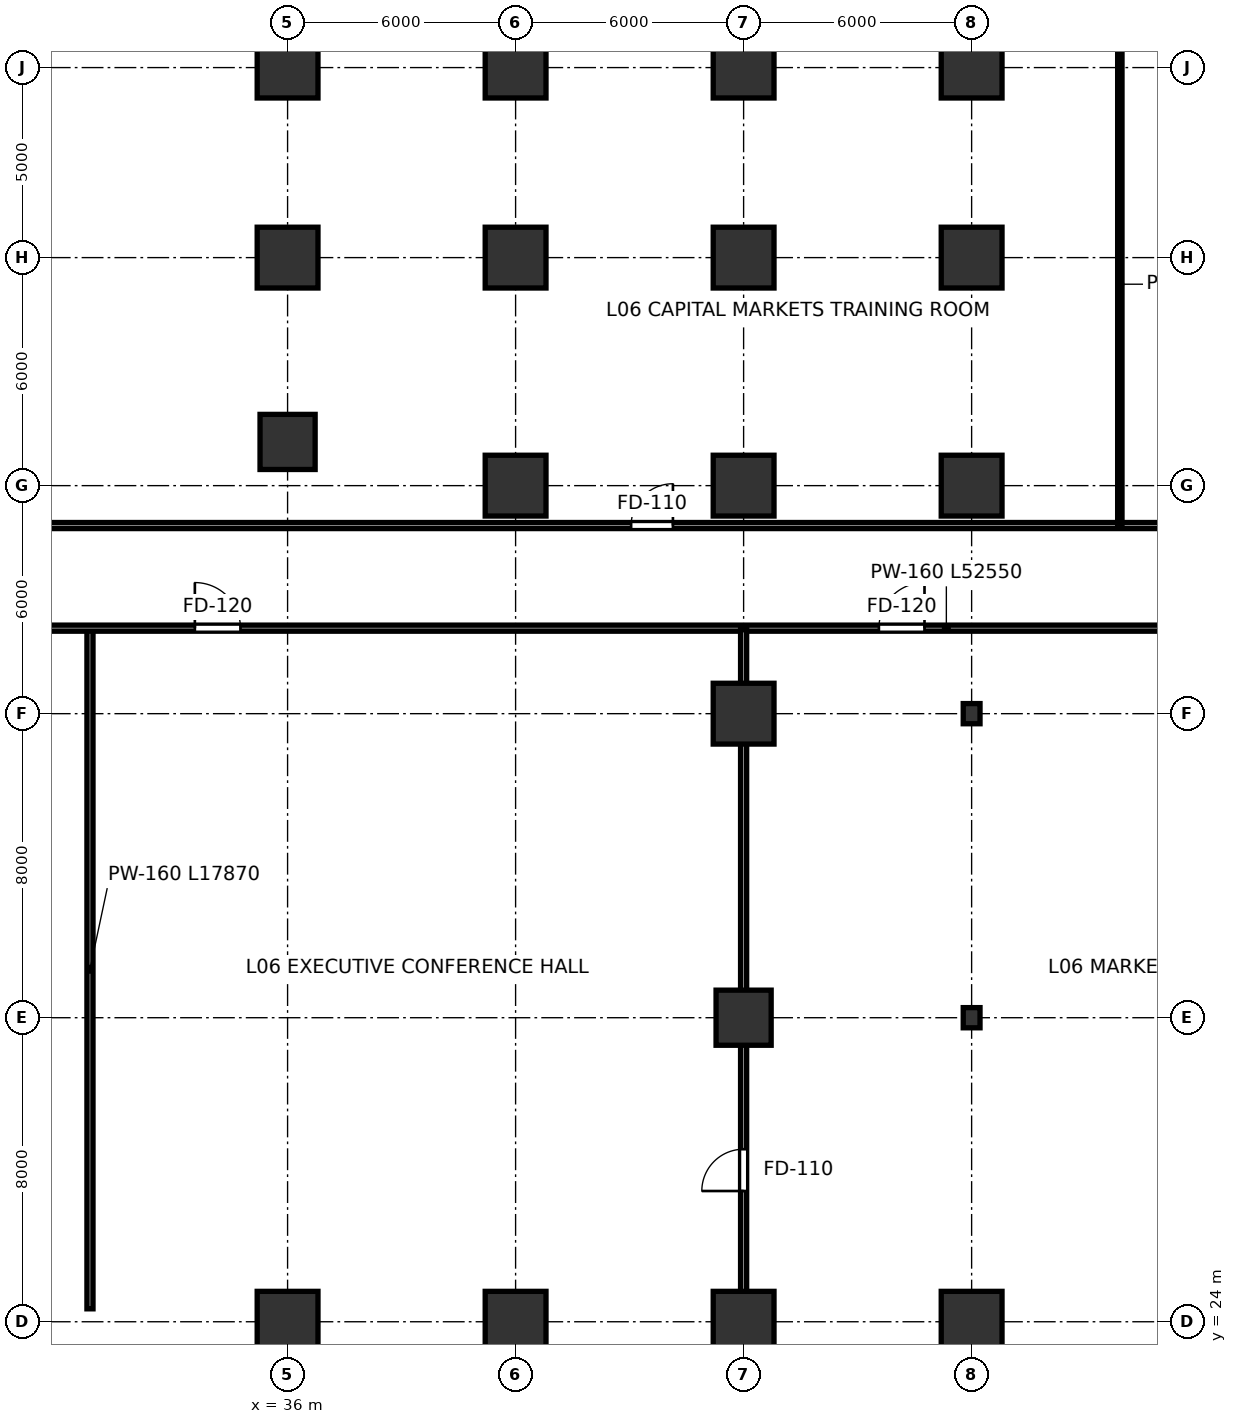
"""IFC4 building model, lengths in metres.
Left out: names, types, materials, properties, quantities, classifications, styles, units other than length and angle.
Written with IfcOpenShell. Run it as: python <this file> out.ifc"""

import sys

from ifc_helpers import new_model, si_unit, direction, frame, frame_2d, origin, origin_2d, place, context, subcontext, project, spatial, rectangle, i_section, extrude, clip, halfspace, source, transform, mapped, element, fill, save


model = new_model("IFC4")
c1 = context("Model", 3, precision=1e-05, world=origin(), true_north=direction((0.0, 1.0)))
c2 = subcontext(c1, "Body", "Model", "MODEL_VIEW")
j1 = project(units=[si_unit("LENGTHUNIT", "METRE"), si_unit("PLANEANGLEUNIT", "RADIAN")], contexts=[c1])
p1 = place(None, origin())
s1 = spatial("IfcSite", under=j1, at=p1, CompositionType="ELEMENT")
p2 = place(p1, origin())
s2 = spatial("IfcBuilding", under=s1, at=p2, CompositionType="ELEMENT")
p3 = place(p2, frame((0.0, 0.0, 28.0)))
s3 = spatial("IfcBuildingStorey", under=s2, at=p3, CompositionType="ELEMENT", Elevation=28.0)
p4 = place(p3, frame((36.0, 24.0, 0.0), z_axis=(-0.074738817011, -0.128755970086, 0.988855909321), x_axis=(0.864855191365, -0.502021411863, 0.0)))
e1 = element("IfcColumn", 1, at=p4, inside=s3, PredefinedType="COLUMN", context=c2, shape_type="Clipping", body=[
    clip(clip(extrude(rectangle(XDim=1.6, YDim=1.6, at=origin_2d()), origin(), (0.0, 0.0, 1.0), 4.854), halfspace(frame((0.0, 0.0, 0.121), z_axis=(0.0, 0.0, -1.0), x_axis=(1.0, 0.0, 0.0)), False)), halfspace(frame((0.0, 0.0, 4.733), z_axis=(0.0, 0.0, 1.0), x_axis=(1.0, 0.0, 0.0)), False)),
])
m1 = source(origin(), c2, "Body", "SweptSolid", [
    extrude(rectangle(XDim=1.6, YDim=1.6, at=origin_2d()), origin(), (0.0, 0.0, 1.0), 4.599),
])
p5 = place(p3, frame((36.0, 52.0, 0.001), z_axis=(0.0, 0.0, 1.0), x_axis=(1.0, 0.0, 0.0)))
e2 = element("IfcColumn", 2, at=p5, inside=s3, PredefinedType="COLUMN", context=c2, shape_type="MappedRepresentation", body=[
    mapped(m1, transform((0.0, 0.0, 0.0), scale=1.0)),
])
m2 = source(origin(), c2, "Body", "SweptSolid", [
    extrude(rectangle(XDim=1.6, YDim=1.6, at=origin_2d()), origin(), (0.0, 0.0, 1.0), 4.599),
])
p6 = place(p3, frame((36.0, 57.0, 0.001), z_axis=(0.0, 0.0, 1.0), x_axis=(1.0, 0.0, 0.0)))
e3 = element("IfcColumn", 3, at=p6, inside=s3, PredefinedType="COLUMN", context=c2, shape_type="MappedRepresentation", body=[
    mapped(m2, transform((0.0, 0.0, 0.0), scale=1.0)),
])
p7 = place(p3, frame((36.0, 47.15, 0.0), z_axis=(0.132401625397, -0.13235166252, 0.982320134692), x_axis=(0.706973327046, 0.707240210144, 0.0)))
e4 = element("IfcColumn", 4, at=p7, inside=s3, PredefinedType="COLUMN", context=c2, shape_type="Clipping", body=[
    clip(clip(extrude(rectangle(XDim=1.45, YDim=1.45, at=origin_2d()), origin(), (0.0, 0.0, 1.0), 4.886), halfspace(frame((0.0, 0.0, 0.139), z_axis=(0.0, 0.0, -1.0), x_axis=(1.0, 0.0, 0.0)), False)), halfspace(frame((0.0, 0.0, 4.748), z_axis=(0.0, 0.0, 1.0), x_axis=(1.0, 0.0, 0.0)), False)),
])
p8 = place(p3, frame((42.0, 24.0, 0.0), z_axis=(-0.075259886608, -0.181142417601, 0.980572982502), x_axis=(0.923467612917, -0.383676384331, 0.0)))
e5 = element("IfcColumn", 5, at=p8, inside=s3, PredefinedType="COLUMN", context=c2, shape_type="Clipping", body=[
    clip(clip(extrude(rectangle(XDim=1.6, YDim=1.6, at=origin_2d()), origin(), (0.0, 0.0, 1.0), 4.895), halfspace(frame((0.0, 0.0, 0.161), z_axis=(0.0, 0.0, -1.0), x_axis=(1.0, 0.0, 0.0)), False)), halfspace(frame((0.0, 0.0, 4.734), z_axis=(0.0, 0.0, 1.0), x_axis=(1.0, 0.0, 0.0)), False)),
])
p9 = place(p3, frame((42.0, 46.0, 0.0), z_axis=(0.120166759651, -0.184417772759, 0.97547426156), x_axis=(0.83783025408, 0.545930824692, 0.0)))
e6 = element("IfcColumn", 6, at=p9, inside=s3, PredefinedType="COLUMN", context=c2, shape_type="Clipping", body=[
    clip(clip(extrude(rectangle(XDim=1.6, YDim=1.6, at=origin_2d()), origin(), (0.0, 0.0, 1.0), 4.921), halfspace(frame((0.0, 0.0, 0.181), z_axis=(0.0, 0.0, -1.0), x_axis=(1.0, 0.0, 0.0)), False)), halfspace(frame((0.0, 0.0, 4.74), z_axis=(0.0, 0.0, 1.0), x_axis=(1.0, 0.0, 0.0)), False)),
])
p10 = place(p3, frame((42.0, 52.0, 0.001), z_axis=(0.0, 0.0, 1.0), x_axis=(1.0, 0.0, 0.0)))
e7 = element("IfcColumn", 7, at=p10, inside=s3, PredefinedType="COLUMN", context=c2, shape_type="MappedRepresentation", body=[
    mapped(m1, transform((0.0, 0.0, 0.0), scale=1.0)),
])
p11 = place(p3, frame((42.0, 57.0, 0.001), z_axis=(0.0, 0.0, 1.0), x_axis=(1.0, 0.0, 0.0)))
e8 = element("IfcColumn", 8, at=p11, inside=s3, PredefinedType="COLUMN", context=c2, shape_type="MappedRepresentation", body=[
    mapped(m2, transform((0.0, 0.0, 0.0), scale=1.0)),
])
p12 = place(p3, frame((48.0, 24.0, 0.0), z_axis=(-0.07561517764, -0.231975329706, 0.969778217593), x_axis=(0.950764807949, -0.309913342672, 0.0)))
e9 = element("IfcColumn", 9, at=p12, inside=s3, PredefinedType="COLUMN", context=c2, shape_type="Clipping", body=[
    clip(clip(extrude(rectangle(XDim=1.6, YDim=1.6, at=origin_2d()), origin(), (0.0, 0.0, 1.0), 4.95), halfspace(frame((0.0, 0.0, 0.202), z_axis=(0.0, 0.0, -1.0), x_axis=(1.0, 0.0, 0.0)), False)), halfspace(frame((0.0, 0.0, 4.748), z_axis=(0.0, 0.0, 1.0), x_axis=(1.0, 0.0, 0.0)), False)),
])
p13 = place(p3, frame((48.0, 32.0, 0.0), z_axis=(-0.005093110912, -0.234134758899, 0.972190811979), x_axis=(0.999763489518, -0.021747759117, 0.0)))
e10 = element("IfcColumn", 10, at=p13, inside=s3, PredefinedType="COLUMN", context=c2, shape_type="Clipping", body=[
    clip(clip(extrude(rectangle(XDim=1.45, YDim=1.45, at=origin_2d()), origin(), (0.0, 0.0, 1.0), 4.937), halfspace(frame((0.0, 0.0, 0.175), z_axis=(0.0, 0.0, -1.0), x_axis=(1.0, 0.0, 0.0)), False)), halfspace(frame((0.0, 0.0, 4.762), z_axis=(0.0, 0.0, 1.0), x_axis=(1.0, 0.0, 0.0)), False)),
])
p14 = place(p3, frame((48.0, 40.0, 0.0), z_axis=(0.065404532384, -0.235081448976, 0.969772632884), x_axis=(0.963407779641, 0.268040015905, 0.0)))
e11 = element("IfcColumn", 11, at=p14, inside=s3, PredefinedType="COLUMN", context=c2, shape_type="Clipping", body=[
    clip(clip(extrude(rectangle(XDim=1.6, YDim=1.6, at=origin_2d()), origin(), (0.0, 0.0, 1.0), 4.95), halfspace(frame((0.0, 0.0, 0.202), z_axis=(0.0, 0.0, -1.0), x_axis=(1.0, 0.0, 0.0)), False)), halfspace(frame((0.0, 0.0, 4.748), z_axis=(0.0, 0.0, 1.0), x_axis=(1.0, 0.0, 0.0)), False)),
])
p15 = place(p3, frame((48.0, 46.0, 0.0), z_axis=(0.117679189372, -0.235014861511, 0.964841760735), x_axis=(0.894165640865, 0.447736313801, 0.0)))
e12 = element("IfcColumn", 12, at=p15, inside=s3, PredefinedType="COLUMN", context=c2, shape_type="Clipping", body=[
    clip(clip(extrude(rectangle(XDim=1.6, YDim=1.6, at=origin_2d()), origin(), (0.0, 0.0, 1.0), 4.975), halfspace(frame((0.0, 0.0, 0.219), z_axis=(0.0, 0.0, -1.0), x_axis=(1.0, 0.0, 0.0)), False)), halfspace(frame((0.0, 0.0, 4.756), z_axis=(0.0, 0.0, 1.0), x_axis=(1.0, 0.0, 0.0)), False)),
])
p16 = place(p3, frame((48.0, 52.0, 0.001), z_axis=(0.0, 0.0, 1.0), x_axis=(1.0, 0.0, 0.0)))
e13 = element("IfcColumn", 13, at=p16, inside=s3, PredefinedType="COLUMN", context=c2, shape_type="MappedRepresentation", body=[
    mapped(m1, transform((0.0, 0.0, 0.0), scale=1.0)),
])
p17 = place(p3, frame((48.0, 57.0, 0.001), z_axis=(0.0, 0.0, 1.0), x_axis=(1.0, 0.0, 0.0)))
e14 = element("IfcColumn", 14, at=p17, inside=s3, PredefinedType="COLUMN", context=c2, shape_type="MappedRepresentation", body=[
    mapped(m2, transform((0.0, 0.0, 0.0), scale=1.0)),
])
p18 = place(p3, frame((54.0, 24.0, 0.0), z_axis=(-0.075715593765, -0.28101385218, 0.956712268001), x_axis=(0.965565696682, -0.260159346154, 0.0)))
e15 = element("IfcColumn", 15, at=p18, inside=s3, PredefinedType="COLUMN", context=c2, shape_type="Clipping", body=[
    clip(clip(extrude(rectangle(XDim=1.6, YDim=1.6, at=origin_2d()), origin(), (0.0, 0.0, 1.0), 5.017), halfspace(frame((0.0, 0.0, 0.244), z_axis=(0.0, 0.0, -1.0), x_axis=(1.0, 0.0, 0.0)), False)), halfspace(frame((0.0, 0.0, 4.773), z_axis=(0.0, 0.0, 1.0), x_axis=(1.0, 0.0, 0.0)), False)),
])
m3 = source(origin(), c2, "Body", "SweptSolid", [
    extrude(i_section(OverallWidth=0.442, OverallDepth=0.531, WebThickness=0.066, FlangeThickness=0.106, FilletRadius=0.015, at=origin_2d()), origin(), (0.0, 0.0, 1.0), 4.599),
])
p19 = place(p3, frame((54.0, 32.0, 0.001), z_axis=(0.0, 0.0, 1.0), x_axis=(1.0, 0.0, 0.0)))
e16 = element("IfcColumn", 16, at=p19, inside=s3, PredefinedType="COLUMN", context=c2, shape_type="MappedRepresentation", body=[
    mapped(m3, transform((0.0, 0.0, 0.0), scale=1.0)),
])
p20 = place(p3, frame((54.0, 40.0, 0.0), z_axis=(0.063403888281, -0.28407666906, 0.956702876052), x_axis=(0.975986028976, 0.217833127057, 0.0)))
e17 = element("IfcColumn", 17, at=p20, inside=s3, PredefinedType="COLUMN", context=c2, shape_type="Clipping", body=[
    clip(clip(extrude(i_section(OverallWidth=0.442, OverallDepth=0.531, WebThickness=0.066, FlangeThickness=0.106, FilletRadius=0.015, at=origin_2d()), origin(), (0.0, 0.0, 1.0), 5.017), halfspace(frame((0.0, 0.0, 0.082), z_axis=(0.0, 0.0, -1.0), x_axis=(1.0, 0.0, 0.0)), False)), halfspace(frame((0.0, 0.0, 4.936), z_axis=(0.0, 0.0, 1.0), x_axis=(1.0, 0.0, 0.0)), False)),
])
p21 = place(p3, frame((54.0, 46.0, 0.0), z_axis=(0.114947559248, -0.283785865524, 0.951973025433), x_axis=(0.92685381155, 0.37542244474, 0.0)))
e18 = element("IfcColumn", 18, at=p21, inside=s3, PredefinedType="COLUMN", context=c2, shape_type="Clipping", body=[
    clip(clip(extrude(rectangle(XDim=1.6, YDim=1.6, at=origin_2d()), origin(), (0.0, 0.0, 1.0), 5.042), halfspace(frame((0.0, 0.0, 0.258), z_axis=(0.0, 0.0, -1.0), x_axis=(1.0, 0.0, 0.0)), False)), halfspace(frame((0.0, 0.0, 4.784), z_axis=(0.0, 0.0, 1.0), x_axis=(1.0, 0.0, 0.0)), False)),
])
p22 = place(p3, frame((54.0, 52.0, 0.001), z_axis=(0.0, 0.0, 1.0), x_axis=(1.0, 0.0, 0.0)))
e19 = element("IfcColumn", 19, at=p22, inside=s3, PredefinedType="COLUMN", context=c2, shape_type="MappedRepresentation", body=[
    mapped(m1, transform((0.0, 0.0, 0.0), scale=1.0)),
])
p23 = place(p3, frame((54.0, 57.0, 0.001), z_axis=(0.0, 0.0, 1.0), x_axis=(1.0, 0.0, 0.0)))
e20 = element("IfcColumn", 20, at=p23, inside=s3, PredefinedType="COLUMN", context=c2, shape_type="MappedRepresentation", body=[
    mapped(m2, transform((0.0, 0.0, 0.0), scale=1.0)),
])
p24 = place(p3, frame((60.0, 24.0, 0.0), z_axis=(-0.075626493605, -0.327938316475, 0.941667188582), x_axis=(0.974424764565, -0.224713992004, 0.0)))
e21 = element("IfcColumn", 21, at=p24, inside=s3, PredefinedType="COLUMN", context=c2, shape_type="Clipping", body=[
    clip(clip(extrude(rectangle(XDim=1.6, YDim=1.6, at=origin_2d()), origin(), (0.0, 0.0, 1.0), 5.097), halfspace(frame((0.0, 0.0, 0.287), z_axis=(0.0, 0.0, -1.0), x_axis=(1.0, 0.0, 0.0)), False)), halfspace(frame((0.0, 0.0, 4.811), z_axis=(0.0, 0.0, 1.0), x_axis=(1.0, 0.0, 0.0)), False)),
])
p25 = place(p3, frame((30.8, 24.34, 0.0), z_axis=(0.0, 0.0, 1.0), x_axis=(0.0, 1.0, 0.0)))
e22 = element("IfcWall", 22, at=p25, inside=s3, PredefinedType="PARTITIONING", context=c2, shape_type="SweptSolid", body=[
    extrude(rectangle(XDim=17.87, YDim=0.16, at=frame_2d((8.935, 0.0))), origin(), (0.0, 0.0, 1.0), 2.505),
])
p26 = place(p3, frame((27.06, 42.25, 0.0), z_axis=(0.0, 0.0, 1.0), x_axis=(1.0, 0.0, 0.0)))
e23 = element("IfcWall", 23, at=p26, inside=s3, PredefinedType="PARTITIONING", context=c2, shape_type="SweptSolid", body=[
    extrude(rectangle(XDim=52.55, YDim=0.16, at=frame_2d((26.275, 0.0))), origin(), (0.0, 0.0, 1.0), 3.255),
])
p27 = place(p26, frame((6.5, 0.0, 0.0)))
e24 = element("IfcOpeningElement", 24, at=p27, cuts=e23, PredefinedType="OPENING", context=c2, shape_type="SweptSolid", body=[
    extrude(rectangle(XDim=1.2, YDim=2.2, at=frame_2d((0.6, 1.1))), frame((0.0, 0.09, 0.0), z_axis=(0.0, -1.0, 0.0), x_axis=(1.0, 0.0, 0.0)), (0.0, 0.0, 1.0), 0.18),
])
p28 = place(p26, frame((24.5, 0.0, 0.0)))
e25 = element("IfcOpeningElement", 25, at=p28, cuts=e23, PredefinedType="OPENING", context=c2, shape_type="SweptSolid", body=[
    extrude(rectangle(XDim=1.2, YDim=2.2, at=frame_2d((0.6, 1.1))), frame((0.0, 0.09, 0.0), z_axis=(0.0, -1.0, 0.0), x_axis=(1.0, 0.0, 0.0)), (0.0, 0.0, 1.0), 0.18),
])
p29 = place(p3, frame((27.14, 44.95, 0.0), z_axis=(0.0, 0.0, 1.0), x_axis=(1.0, 0.0, 0.0)))
e26 = element("IfcWall", 26, at=p29, inside=s3, PredefinedType="PARTITIONING", context=c2, shape_type="SweptSolid", body=[
    extrude(rectangle(XDim=52.47, YDim=0.16, at=frame_2d((26.235, 0.0))), origin(), (0.0, 0.0, 1.0), 3.255),
])
p30 = place(p29, frame((17.9, 0.0, 0.0)))
e27 = element("IfcOpeningElement", 27, at=p30, cuts=e26, PredefinedType="OPENING", context=c2, shape_type="SweptSolid", body=[
    extrude(rectangle(XDim=1.1, YDim=2.2, at=frame_2d((0.55, 1.1))), frame((0.0, 0.09, 0.0), z_axis=(0.0, -1.0, 0.0), x_axis=(1.0, 0.0, 0.0)), (0.0, 0.0, 1.0), 0.18),
])
p31 = place(p29, frame((34.9, 0.0, 0.0)))
e28 = element("IfcOpeningElement", 28, at=p31, cuts=e26, PredefinedType="OPENING", context=c2, shape_type="SweptSolid", body=[
    extrude(rectangle(XDim=1.1, YDim=2.2, at=frame_2d((0.55, 1.1))), frame((0.0, 0.09, 0.0), z_axis=(0.0, -1.0, 0.0), x_axis=(1.0, 0.0, 0.0)), (0.0, 0.0, 1.0), 0.18),
])
p32 = place(p3, frame((57.9, 44.99, 0.0), z_axis=(0.0, 0.0, 1.0), x_axis=(0.0, 1.0, 0.0)))
e29 = element("IfcWall", 29, at=p32, inside=s3, PredefinedType="PARTITIONING", context=c2, shape_type="SweptSolid", body=[
    extrude(rectangle(XDim=12.62, YDim=0.115, at=frame_2d((6.31, 0.0))), origin(), (0.0, 0.0, 1.0), 3.792),
])
p33 = place(p3, frame((48.0, 24.44, 0.0), z_axis=(0.0, 0.0, 1.0), x_axis=(0.0, 1.0, 0.0)))
e30 = element("IfcWall", 30, at=p33, inside=s3, PredefinedType="PARTITIONING", context=c2, shape_type="SweptSolid", body=[
    extrude(rectangle(XDim=17.77, YDim=0.16, at=frame_2d((8.885, 0.0))), origin(), (0.0, 0.0, 1.0), 2.505),
])
p34 = place(p33, frame((3.0, 0.0, 0.0)))
e31 = element("IfcOpeningElement", 31, at=p34, cuts=e30, PredefinedType="OPENING", context=c2, shape_type="SweptSolid", body=[
    extrude(rectangle(XDim=1.1, YDim=2.2, at=frame_2d((0.55, 1.1))), frame((0.0, 0.09, 0.0), z_axis=(0.0, -1.0, 0.0), x_axis=(1.0, 0.0, 0.0)), (0.0, 0.0, 1.0), 0.18),
])
m4 = source(origin(), c2, "Body", "SweptSolid", [
    extrude(rectangle(XDim=1.2, YDim=2.2, at=frame_2d((0.6, 1.1))), frame((0.0, 0.025, 0.0), z_axis=(0.0, -1.0, 0.0), x_axis=(1.0, 0.0, 0.0)), (0.0, 0.0, 1.0), 0.05),
])
p35 = place(p27, origin())
e32 = element("IfcDoor", 32, at=p35, inside=s3, OperationType="SINGLE_SWING_LEFT", PredefinedType="DOOR", context=c2, shape_type="MappedRepresentation", body=[
    mapped(m4, transform((0.0, 0.0, 0.0), scale=1.0)),
])
fill(e24, e32)
p36 = place(p28, origin())
e33 = element("IfcDoor", 33, at=p36, inside=s3, OperationType="SINGLE_SWING_RIGHT", PredefinedType="DOOR", context=c2, shape_type="MappedRepresentation", body=[
    mapped(m4, transform((0.0, 0.0, 0.0), scale=1.0)),
])
fill(e25, e33)
m5 = source(origin(), c2, "Body", "SweptSolid", [
    extrude(rectangle(XDim=1.1, YDim=2.2, at=frame_2d((0.55, 1.1))), frame((0.0, 0.025, 0.0), z_axis=(0.0, -1.0, 0.0), x_axis=(1.0, 0.0, 0.0)), (0.0, 0.0, 1.0), 0.05),
])
p37 = place(p30, origin())
e34 = element("IfcDoor", 34, at=p37, inside=s3, OperationType="SINGLE_SWING_RIGHT", PredefinedType="DOOR", context=c2, shape_type="MappedRepresentation", body=[
    mapped(m5, transform((0.0, 0.0, 0.0), scale=1.0)),
])
fill(e27, e34)
p38 = place(p34, origin())
e35 = element("IfcDoor", 35, at=p38, inside=s3, OperationType="SINGLE_SWING_LEFT", PredefinedType="DOOR", context=c2, shape_type="MappedRepresentation", body=[
    mapped(m5, transform((0.0, 0.0, 0.0), scale=1.0)),
])
fill(e31, e35)
save(model, sys.argv[1])
